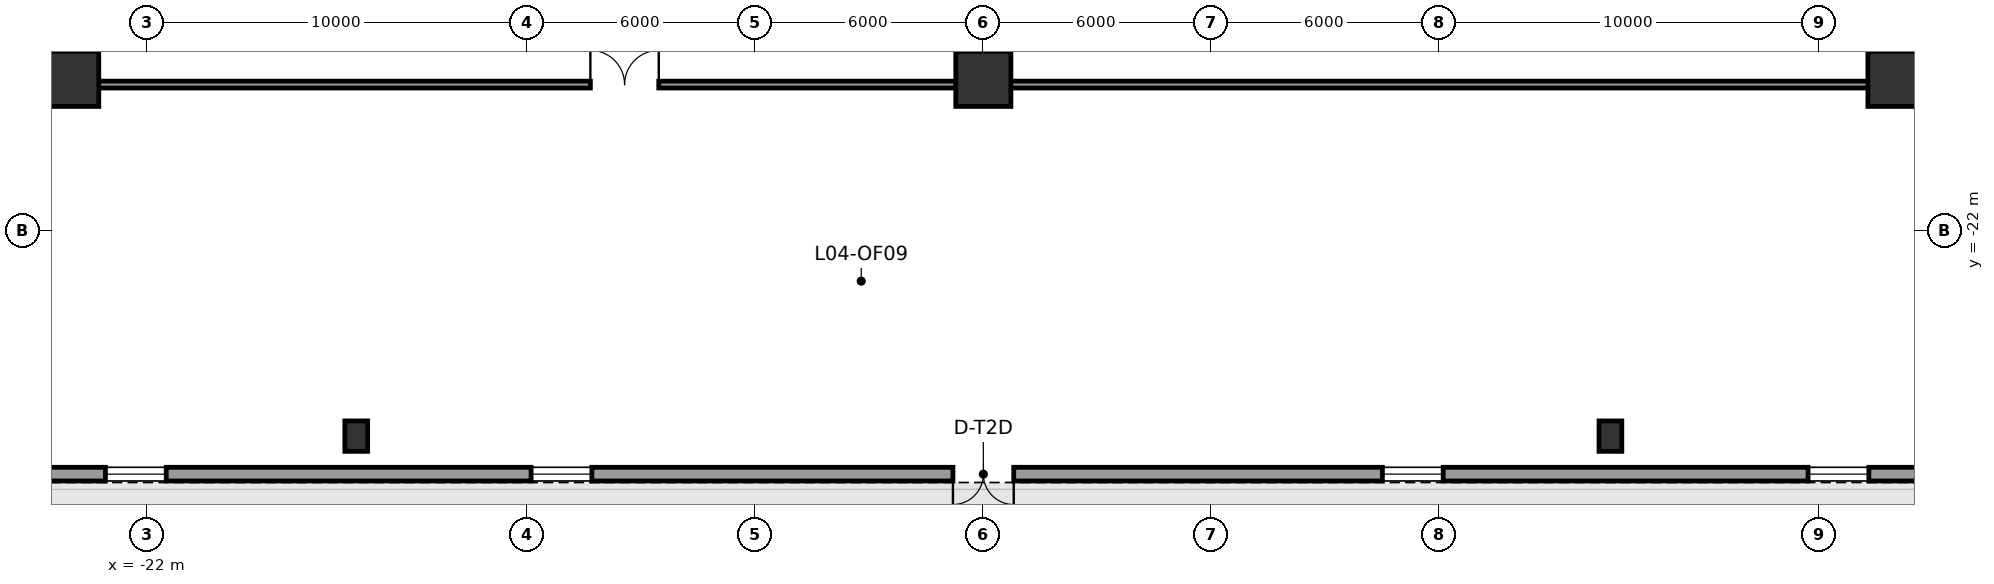
"""IFC4 building model, lengths in metres.
Left out: names, types, materials, properties, quantities, classifications, styles, units other than length and angle.
Written with IfcOpenShell. Run it as: python <this file> out.ifc"""

import sys

from ifc_helpers import new_model, si_unit, direction, frame, frame_2d, origin, origin_2d, place, context, subcontext, project, spatial, rectangle, hollow_rectangle, extrude, element, fill, save


model = new_model("IFC4")
c1 = context("Model", 3, precision=1e-05, world=origin(), true_north=direction((0.0, 1.0)))
c2 = subcontext(c1, "Body", "Model", "MODEL_VIEW")
j1 = project(units=[si_unit("LENGTHUNIT", "METRE"), si_unit("PLANEANGLEUNIT", "RADIAN")], contexts=[c1])
p1 = place(None, origin())
s1 = spatial("IfcSite", under=j1, at=p1, CompositionType="ELEMENT")
p2 = place(p1, origin())
s2 = spatial("IfcBuilding", under=s1, at=p2, CompositionType="ELEMENT")
p3 = place(p2, frame((0.0, 0.0, 23.5)))
s3 = spatial("IfcBuildingStorey", under=s2, at=p3, CompositionType="ELEMENT", Elevation=23.5)
for number, where, z_axis, x_axis in (
    (1, (-24.0, -18.0, 0.0), (0.0, 0.0, 1.0), (1.0, 0.0, 0.0)),
    (2, (24.0, -18.0, 0.0), (0.0, 0.0, 1.0), (1.0, 0.0, 0.0)),
    (3, (0.0, -18.0, 0.0), (0.0, 0.0, 1.0), (1.0, 0.0, 0.0)),
):
    element("IfcColumn", number, at=place(p3, frame(where, z_axis=z_axis, x_axis=x_axis)), inside=s3, PredefinedType="COLUMN", context=c2, shape_type="SweptSolid", body=[
        extrude(rectangle(XDim=1.45, YDim=1.45, at=origin_2d()), origin(), (0.0, 0.0, 1.0), 5.5),
    ])
for number, where, z_axis, x_axis in (
    (4, (-16.5, -27.4, 0.0), (0.0, 0.0, 1.0), (1.0, 0.0, 0.0)),
    (5, (16.5, -27.4, 0.0), (0.0, 0.0, 1.0), (1.0, 0.0, 0.0)),
):
    element("IfcColumn", number, at=place(p3, frame(where, z_axis=z_axis, x_axis=x_axis)), inside=s3, PredefinedType="COLUMN", context=c2, shape_type="SweptSolid", body=[
        extrude(hollow_rectangle(XDim=0.6, YDim=0.8, WallThickness=0.05, at=origin_2d()), origin(), (0.0, 0.0, 1.0), 5.5),
    ])
p4 = place(p3, frame((39.3, -28.4, 0.0), z_axis=(0.0, 0.0, 1.0), x_axis=(-1.0, 0.0, 0.0)))
e6 = element("IfcWall", 6, at=p4, inside=s3, PredefinedType="STANDARD", context=c2, shape_type="SweptSolid", body=[
    extrude(rectangle(XDim=78.6, YDim=0.36, at=frame_2d((39.3, 0.0))), origin(), (0.0, 0.0, 1.0), 5.15),
])
p5 = place(p4, frame((38.5, 0.0, 0.0)))
e7 = element("IfcOpeningElement", 7, at=p5, cuts=e6, PredefinedType="OPENING", context=c2, shape_type="SweptSolid", body=[
    extrude(rectangle(XDim=1.6, YDim=2.2, at=frame_2d((0.8, 1.1))), frame((0.0, 0.19, 0.0), z_axis=(0.0, -1.0, 0.0), x_axis=(1.0, 0.0, 0.0)), (0.0, 0.0, 1.0), 0.38),
])
p6 = place(p4, frame((4.8, 0.0, 0.9)))
e8 = element("IfcOpeningElement", 8, at=p6, cuts=e6, PredefinedType="OPENING", context=c2, shape_type="SweptSolid", body=[
    extrude(rectangle(XDim=1.6, YDim=2.6, at=frame_2d((0.8, 1.3))), frame((0.0, 0.19, 0.0), z_axis=(0.0, -1.0, 0.0), x_axis=(1.0, 0.0, 0.0)), (0.0, 0.0, 1.0), 0.38),
])
p7 = place(p4, frame((10.4, 0.0, 0.9)))
e9 = element("IfcOpeningElement", 9, at=p7, cuts=e6, PredefinedType="OPENING", context=c2, shape_type="SweptSolid", body=[
    extrude(rectangle(XDim=1.6, YDim=2.6, at=frame_2d((0.8, 1.3))), frame((0.0, 0.19, 0.0), z_axis=(0.0, -1.0, 0.0), x_axis=(1.0, 0.0, 0.0)), (0.0, 0.0, 1.0), 0.38),
])
p8 = place(p4, frame((16.0, 0.0, 0.9)))
e10 = element("IfcOpeningElement", 10, at=p8, cuts=e6, PredefinedType="OPENING", context=c2, shape_type="SweptSolid", body=[
    extrude(rectangle(XDim=1.6, YDim=2.6, at=frame_2d((0.8, 1.3))), frame((0.0, 0.19, 0.0), z_axis=(0.0, -1.0, 0.0), x_axis=(1.0, 0.0, 0.0)), (0.0, 0.0, 1.0), 0.38),
])
p9 = place(p4, frame((27.2, 0.0, 0.9)))
e11 = element("IfcOpeningElement", 11, at=p9, cuts=e6, PredefinedType="OPENING", context=c2, shape_type="SweptSolid", body=[
    extrude(rectangle(XDim=1.6, YDim=2.6, at=frame_2d((0.8, 1.3))), frame((0.0, 0.19, 0.0), z_axis=(0.0, -1.0, 0.0), x_axis=(1.0, 0.0, 0.0)), (0.0, 0.0, 1.0), 0.38),
])
p10 = place(p4, frame((49.6, 0.0, 0.9)))
e12 = element("IfcOpeningElement", 12, at=p10, cuts=e6, PredefinedType="OPENING", context=c2, shape_type="SweptSolid", body=[
    extrude(rectangle(XDim=1.6, YDim=2.6, at=frame_2d((0.8, 1.3))), frame((0.0, 0.19, 0.0), z_axis=(0.0, -1.0, 0.0), x_axis=(1.0, 0.0, 0.0)), (0.0, 0.0, 1.0), 0.38),
])
p11 = place(p4, frame((60.8, 0.0, 0.9)))
e13 = element("IfcOpeningElement", 13, at=p11, cuts=e6, PredefinedType="OPENING", context=c2, shape_type="SweptSolid", body=[
    extrude(rectangle(XDim=1.6, YDim=2.6, at=frame_2d((0.8, 1.3))), frame((0.0, 0.19, 0.0), z_axis=(0.0, -1.0, 0.0), x_axis=(1.0, 0.0, 0.0)), (0.0, 0.0, 1.0), 0.38),
])
p12 = place(p4, frame((66.4, 0.0, 0.9)))
e14 = element("IfcOpeningElement", 14, at=p12, cuts=e6, PredefinedType="OPENING", context=c2, shape_type="SweptSolid", body=[
    extrude(rectangle(XDim=1.6, YDim=2.6, at=frame_2d((0.8, 1.3))), frame((0.0, 0.19, 0.0), z_axis=(0.0, -1.0, 0.0), x_axis=(1.0, 0.0, 0.0)), (0.0, 0.0, 1.0), 0.38),
])
p13 = place(p4, frame((72.0, 0.0, 0.9)))
e15 = element("IfcOpeningElement", 15, at=p13, cuts=e6, PredefinedType="OPENING", context=c2, shape_type="SweptSolid", body=[
    extrude(rectangle(XDim=1.6, YDim=2.6, at=frame_2d((0.8, 1.3))), frame((0.0, 0.19, 0.0), z_axis=(0.0, -1.0, 0.0), x_axis=(1.0, 0.0, 0.0)), (0.0, 0.0, 1.0), 0.38),
])
p14 = place(p3, frame((-23.6, -18.15, 0.0), z_axis=(0.0, 0.0, 1.0), x_axis=(1.0, 0.0, 0.0)))
e16 = element("IfcWall", 16, at=p14, inside=s3, PredefinedType="PARTITIONING", context=c2, shape_type="SweptSolid", body=[
    extrude(rectangle(XDim=47.2, YDim=0.18, at=frame_2d((23.6, 0.0))), origin(), (0.0, 0.0, 1.0), 3.33),
])
p15 = place(p14, frame((13.26, 0.0, 0.0)))
e17 = element("IfcOpeningElement", 17, at=p15, cuts=e16, PredefinedType="OPENING", context=c2, shape_type="SweptSolid", body=[
    extrude(rectangle(XDim=1.8, YDim=2.2, at=frame_2d((0.9, 1.1))), frame((0.0, 0.1, 0.0), z_axis=(0.0, -1.0, 0.0), x_axis=(1.0, 0.0, 0.0)), (0.0, 0.0, 1.0), 0.2),
])
p16 = place(p5, origin())
e18 = element("IfcDoor", 18, at=p16, inside=s3, OperationType="DOUBLE_DOOR_SINGLE_SWING", PredefinedType="DOOR", context=c2, shape_type="SweptSolid", body=[
    extrude(rectangle(XDim=1.6, YDim=2.2, at=frame_2d((0.8, 1.1))), frame((0.0, 0.025, 0.0), z_axis=(0.0, -1.0, 0.0), x_axis=(1.0, 0.0, 0.0)), (0.0, 0.0, 1.0), 0.05),
])
fill(e7, e18)
p17 = place(p8, origin())
e19 = element("IfcWindow", 19, at=p17, inside=s3, PartitioningType="DOUBLE_PANEL_VERTICAL", PredefinedType="WINDOW", context=c2, shape_type="SweptSolid", body=[
    extrude(rectangle(XDim=1.6, YDim=2.6, at=frame_2d((0.8, 1.3))), frame((0.0, 0.03, 0.0), z_axis=(0.0, -1.0, 0.0), x_axis=(1.0, 0.0, 0.0)), (0.0, 0.0, 1.0), 0.06),
])
fill(e10, e19)
p18 = place(p9, origin())
e20 = element("IfcWindow", 20, at=p18, inside=s3, PartitioningType="DOUBLE_PANEL_VERTICAL", PredefinedType="WINDOW", context=c2, shape_type="SweptSolid", body=[
    extrude(rectangle(XDim=1.6, YDim=2.6, at=frame_2d((0.8, 1.3))), frame((0.0, 0.03, 0.0), z_axis=(0.0, -1.0, 0.0), x_axis=(1.0, 0.0, 0.0)), (0.0, 0.0, 1.0), 0.06),
])
fill(e11, e20)
p19 = place(p10, origin())
e21 = element("IfcWindow", 21, at=p19, inside=s3, PartitioningType="DOUBLE_PANEL_VERTICAL", PredefinedType="WINDOW", context=c2, shape_type="SweptSolid", body=[
    extrude(rectangle(XDim=1.6, YDim=2.6, at=frame_2d((0.8, 1.3))), frame((0.0, 0.03, 0.0), z_axis=(0.0, -1.0, 0.0), x_axis=(1.0, 0.0, 0.0)), (0.0, 0.0, 1.0), 0.06),
])
fill(e12, e21)
p20 = place(p11, origin())
e22 = element("IfcWindow", 22, at=p20, inside=s3, PartitioningType="DOUBLE_PANEL_VERTICAL", PredefinedType="WINDOW", context=c2, shape_type="SweptSolid", body=[
    extrude(rectangle(XDim=1.6, YDim=2.6, at=frame_2d((0.8, 1.3))), frame((0.0, 0.03, 0.0), z_axis=(0.0, -1.0, 0.0), x_axis=(1.0, 0.0, 0.0)), (0.0, 0.0, 1.0), 0.06),
])
fill(e13, e22)
p21 = place(p15, origin())
e23 = element("IfcDoor", 23, at=p21, inside=s3, OperationType="DOUBLE_DOOR_SINGLE_SWING", PredefinedType="DOOR", context=c2, shape_type="SweptSolid", body=[
    extrude(rectangle(XDim=1.8, YDim=2.2, at=frame_2d((0.9, 1.1))), frame((0.0, 0.025, 0.0), z_axis=(0.0, -1.0, 0.0), x_axis=(1.0, 0.0, 0.0)), (0.0, 0.0, 1.0), 0.05),
])
fill(e17, e23)
save(model, sys.argv[1])
